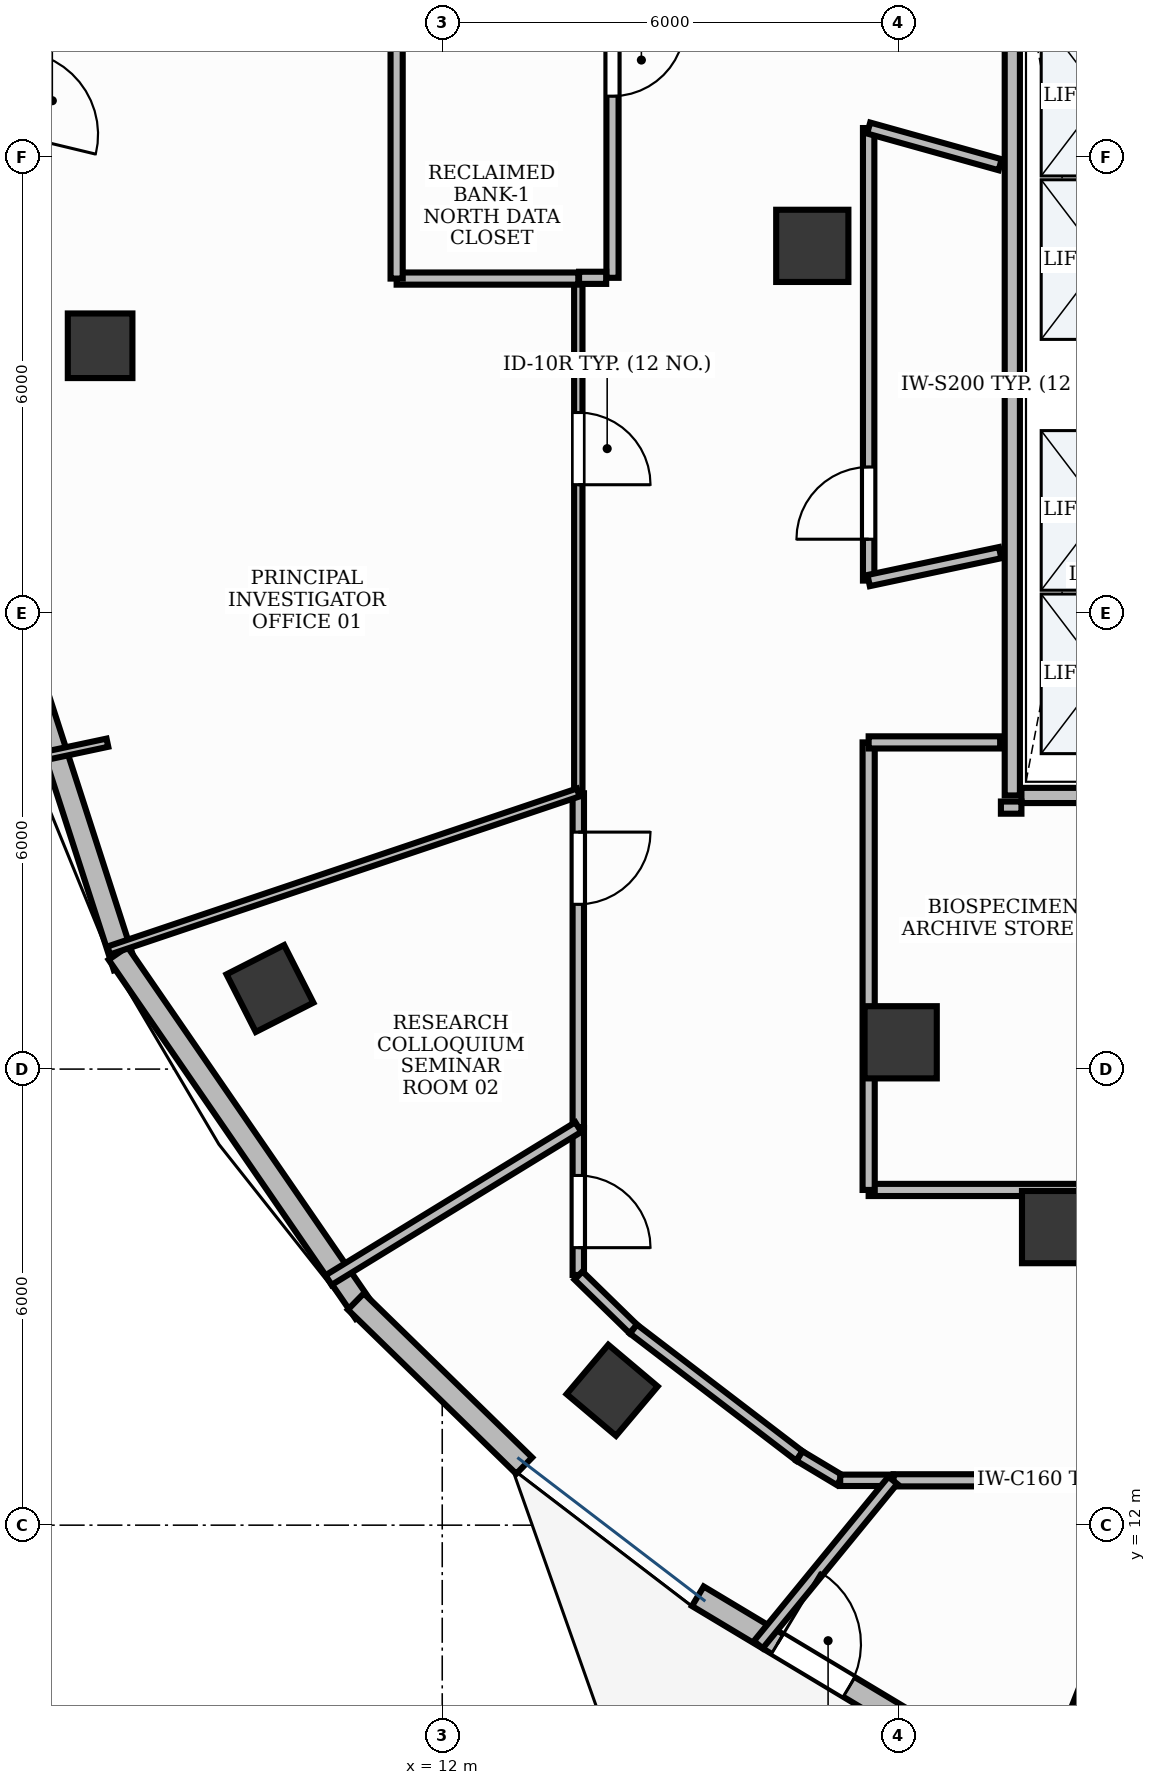
"""IFC4 building model, lengths in metres.
Left out: names, types, materials, properties, quantities, classifications, styles, units other than length and angle.
Written with IfcOpenShell. Run it as: python <this file> out.ifc"""

import sys

from ifc_helpers import new_model, si_unit, direction, frame, frame_2d, origin, origin_2d, place, context, subcontext, project, spatial, rectangle, extrude, element, fill, save


model = new_model("IFC4")
c1 = context("Model", 3, precision=1e-05, world=origin(), true_north=direction((0.0, 1.0)))
c2 = subcontext(c1, "Body", "Model", "MODEL_VIEW")
j1 = project(units=[si_unit("LENGTHUNIT", "METRE"), si_unit("PLANEANGLEUNIT", "RADIAN")], contexts=[c1])
p1 = place(None, origin())
s1 = spatial("IfcSite", under=j1, at=p1, CompositionType="ELEMENT")
p2 = place(p1, origin())
s2 = spatial("IfcBuilding", under=s1, at=p2, CompositionType="ELEMENT")
p3 = place(p2, frame((0.0, 0.0, 256.2)))
s3 = spatial("IfcBuildingStorey", under=s2, at=p3, CompositionType="ELEMENT", Elevation=256.2)
p4 = place(p3, frame((7.499, 27.516, -0.0), z_axis=(0.0, 0.0, 1.0), x_axis=(0.0, 1.0, 0.0)))
e1 = element("IfcColumn", 1, at=p4, inside=s3, PredefinedType="COLUMN", context=c2, shape_type="SweptSolid", body=[
    extrude(rectangle(XDim=0.85, YDim=0.85, at=origin_2d()), origin(), (0.0, 0.0, 1.0), 3.901),
])
p5 = place(p3, frame((16.868, 28.83, -0.0), z_axis=(0.0, 0.0, 1.0), x_axis=(1.0, 0.0, 0.0)))
e2 = element("IfcColumn", 2, at=p5, inside=s3, PredefinedType="COLUMN", context=c2, shape_type="SweptSolid", body=[
    extrude(rectangle(XDim=0.95, YDim=0.95, at=origin_2d()), origin(), (0.0, 0.0, 1.0), 3.901),
])
p6 = place(p3, frame((9.733, 19.06, -0.0), z_axis=(0.0, 0.0, 1.0), x_axis=(-0.453057191132, 0.891481453292, 0.0)))
e3 = element("IfcColumn", 3, at=p6, inside=s3, PredefinedType="COLUMN", context=c2, shape_type="SweptSolid", body=[
    extrude(rectangle(XDim=0.85, YDim=0.85, at=origin_2d()), origin(), (0.0, 0.0, 1.0), 3.901),
])
p7 = place(p3, frame((18.031, 18.353, -0.0), z_axis=(0.0, 0.0, 1.0), x_axis=(1.0, 0.0, 0.0)))
e4 = element("IfcColumn", 4, at=p7, inside=s3, PredefinedType="COLUMN", context=c2, shape_type="SweptSolid", body=[
    extrude(rectangle(XDim=0.95, YDim=0.95, at=origin_2d()), origin(), (0.0, 0.0, 1.0), 3.901),
])
p8 = place(p3, frame((14.235, 13.775, -0.0), z_axis=(0.0, 0.0, 1.0), x_axis=(-0.764246456939, 0.644924300253, 0.0)))
e5 = element("IfcColumn", 5, at=p8, inside=s3, PredefinedType="COLUMN", context=c2, shape_type="SweptSolid", body=[
    extrude(rectangle(XDim=0.85, YDim=0.85, at=origin_2d()), origin(), (0.0, 0.0, 1.0), 3.901),
])
p9 = place(p3, frame((20.102, 15.921, -0.0), z_axis=(0.0, 0.0, 1.0), x_axis=(1.0, 0.0, 0.0)))
e6 = element("IfcColumn", 6, at=p9, inside=s3, PredefinedType="COLUMN", context=c2, shape_type="SweptSolid", body=[
    extrude(rectangle(XDim=0.95, YDim=0.95, at=origin_2d()), origin(), (0.0, 0.0, 1.0), 3.901),
])
p10 = place(p3, frame((20.803, 9.78, -0.0), z_axis=(0.0, 0.0, 1.0), x_axis=(-0.930225540858, 0.366988341962, 0.0)))
e7 = element("IfcColumn", 7, at=p10, inside=s3, PredefinedType="COLUMN", context=c2, shape_type="SweptSolid", body=[
    extrude(rectangle(XDim=0.85, YDim=0.85, at=origin_2d()), origin(), (0.0, 0.0, 1.0), 3.901),
])
p11 = place(p3, frame((6.822, 32.164, 0.0), z_axis=(0.0, 0.0, 1.0), x_axis=(-0.233611743884, -0.972329961031, 0.0)))
e8 = element("IfcWall", 8, at=p11, inside=s3, PredefinedType="STANDARD", context=c2, shape_type="SweptSolid", body=[
    extrude(rectangle(XDim=2.745, YDim=0.3, at=frame_2d((1.373, 0.0))), origin(), (0.0, 0.0, 1.0), 3.9),
])
p12 = place(p11, frame((0.823, 0.0, 0.0)))
e9 = element("IfcOpeningElement", 9, at=p12, cuts=e8, PredefinedType="OPENING", context=c2, shape_type="SweptSolid", body=[
    extrude(rectangle(XDim=1.1, YDim=2.15, at=frame_2d((0.55, 1.075))), frame((0.0, 0.165, 0.0), z_axis=(0.0, -1.0, 0.0), x_axis=(1.0, 0.0, 0.0)), (0.0, 0.0, 1.0), 0.33),
])
p13 = place(p3, frame((15.363, 11.065, 0.0), z_axis=(0.0, 0.0, 1.0), x_axis=(0.857526080841, -0.514440492844, 0.0)))
e10 = element("IfcWall", 10, at=p13, inside=s3, PredefinedType="STANDARD", context=c2, shape_type="SweptSolid", body=[
    extrude(rectangle(XDim=3.249, YDim=0.3, at=frame_2d((1.624, 0.0))), origin(), (0.0, 0.0, 1.0), 3.9),
])
p14 = place(p13, frame((1.22, 0.0, 0.0)))
e11 = element("IfcOpeningElement", 11, at=p14, cuts=e10, PredefinedType="OPENING", context=c2, shape_type="SweptSolid", body=[
    extrude(rectangle(XDim=1.1, YDim=2.15, at=frame_2d((0.55, 1.075))), frame((0.0, 0.165, 0.0), z_axis=(0.0, -1.0, 0.0), x_axis=(1.0, 0.0, 0.0)), (0.0, 0.0, 1.0), 0.33),
])
p15 = place(p3, frame((6.147, 24.529, 0.0), z_axis=(0.0, 0.0, 1.0), x_axis=(0.307501658213, -0.951547544895, 0.0)))
e12 = element("IfcWall", 12, at=p15, inside=s3, PredefinedType="STANDARD", context=c2, shape_type="SweptSolid", body=[
    extrude(rectangle(XDim=5.447, YDim=0.3, at=frame_2d((2.724, 0.0))), origin(), (0.0, 0.0, 1.0), 3.9),
])
p16 = place(p3, frame((7.735, 19.524, 0.0), z_axis=(0.0, 0.0, 1.0), x_axis=(0.566669772846, -0.823945003349, 0.0)))
e13 = element("IfcWall", 13, at=p16, inside=s3, PredefinedType="STANDARD", context=c2, shape_type="SweptSolid", body=[
    extrude(rectangle(XDim=5.734, YDim=0.3, at=frame_2d((2.867, 0.0))), origin(), (0.0, 0.0, 1.0), 3.9),
])
p17 = place(p3, frame((10.863, 14.942, 0.0), z_axis=(0.0, 0.0, 1.0), x_axis=(0.71600802955, -0.698092043802, 0.0)))
e14 = element("IfcWall", 14, at=p17, inside=s3, PredefinedType="STANDARD", context=c2, shape_type="SweptSolid", body=[
    extrude(rectangle(XDim=3.093, YDim=0.3, at=frame_2d((1.547, 0.0))), origin(), (0.0, 0.0, 1.0), 3.9),
])
p18 = place(p3, frame((19.5, 21.6, 0.0), z_axis=(0.0, 0.0, 1.0), x_axis=(0.0, 1.0, 0.0)))
e15 = element("IfcWall", 15, at=p18, inside=s3, PredefinedType="PARTITIONING", context=c2, shape_type="SweptSolid", body=[
    extrude(rectangle(XDim=10.8, YDim=0.2, at=frame_2d((5.4, 0.0))), origin(), (0.0, 0.0, 1.0), 2.22),
])
p19 = place(p3, frame((19.62, 21.6, 0.0), z_axis=(0.0, 0.0, 1.0), x_axis=(1.0, 0.0, 0.0)))
e16 = element("IfcWall", 16, at=p19, inside=s3, PredefinedType="PARTITIONING", context=c2, shape_type="SweptSolid", body=[
    extrude(rectangle(XDim=2.11, YDim=0.2, at=frame_2d((1.055, 0.0))), origin(), (0.0, 0.0, 1.0), 2.22),
])
p20 = place(p3, frame((14.24, 31.99, 0.0), z_axis=(0.0, 0.0, 1.0), x_axis=(0.0, -1.0, 0.0)))
e17 = element("IfcWall", 17, at=p20, inside=s3, PredefinedType="PARTITIONING", context=c2, shape_type="SweptSolid", body=[
    extrude(rectangle(XDim=3.58, YDim=0.16, at=frame_2d((1.79, 0.0))), origin(), (0.0, 0.0, 1.0), 2.22),
])
p21 = place(p20, frame((0.24, 0.0, 0.0)))
e18 = element("IfcOpeningElement", 18, at=p21, cuts=e17, PredefinedType="OPENING", context=c2, shape_type="SweptSolid", body=[
    extrude(rectangle(XDim=0.95, YDim=2.15, at=frame_2d((0.475, 1.075))), frame((0.0, 0.095, 0.0), z_axis=(0.0, -1.0, 0.0), x_axis=(1.0, 0.0, 0.0)), (0.0, 0.0, 1.0), 0.19),
])
p22 = place(p3, frame((13.79, 28.39, 0.0), z_axis=(0.0, 0.0, 1.0), x_axis=(0.0, -1.0, 0.0)))
e19 = element("IfcWall", 19, at=p22, inside=s3, PredefinedType="MOVABLE", context=c2, shape_type="SweptSolid", body=[
    extrude(rectangle(XDim=6.75, YDim=0.11, at=frame_2d((3.375, 0.0))), origin(), (0.0, 0.0, 1.0), 2.22),
])
p23 = place(p22, frame((1.752, 0.0, 0.0)))
e20 = element("IfcOpeningElement", 20, at=p23, cuts=e19, PredefinedType="OPENING", context=c2, shape_type="SweptSolid", body=[
    extrude(rectangle(XDim=0.95, YDim=2.15, at=frame_2d((0.475, 1.075))), frame((0.0, 0.07, 0.0), z_axis=(0.0, -1.0, 0.0), x_axis=(1.0, 0.0, 0.0)), (0.0, 0.0, 1.0), 0.14),
])
p24 = place(p3, frame((13.79, 21.629, 0.0), z_axis=(0.0, 0.0, 1.0), x_axis=(0.0, -1.0, 0.0)))
e21 = element("IfcWall", 21, at=p24, inside=s3, PredefinedType="PARTITIONING", context=c2, shape_type="SweptSolid", body=[
    extrude(rectangle(XDim=4.392, YDim=0.15, at=frame_2d((2.196, 0.0))), origin(), (0.0, 0.0, 1.0), 2.22),
])
p25 = place(p24, frame((0.511, 0.0, 0.0)))
e22 = element("IfcOpeningElement", 22, at=p25, cuts=e21, PredefinedType="OPENING", context=c2, shape_type="SweptSolid", body=[
    extrude(rectangle(XDim=0.95, YDim=2.15, at=frame_2d((0.475, 1.075))), frame((0.0, 0.09, 0.0), z_axis=(0.0, -1.0, 0.0), x_axis=(1.0, 0.0, 0.0)), (0.0, 0.0, 1.0), 0.18),
])
p26 = place(p3, frame((13.79, 17.226, 0.0), z_axis=(0.0, 0.0, 1.0), x_axis=(0.0, -1.0, 0.0)))
e23 = element("IfcWall", 23, at=p26, inside=s3, PredefinedType="PARTITIONING", context=c2, shape_type="SweptSolid", body=[
    extrude(rectangle(XDim=1.934, YDim=0.15, at=frame_2d((0.967, 0.0))), origin(), (0.0, 0.0, 1.0), 2.22),
])
p27 = place(p26, frame((0.625, 0.0, 0.0)))
e24 = element("IfcOpeningElement", 24, at=p27, cuts=e23, PredefinedType="OPENING", context=c2, shape_type="SweptSolid", body=[
    extrude(rectangle(XDim=0.95, YDim=2.15, at=frame_2d((0.475, 1.075))), frame((0.0, 0.09, 0.0), z_axis=(0.0, -1.0, 0.0), x_axis=(1.0, 0.0, 0.0)), (0.0, 0.0, 1.0), 0.18),
])
p28 = place(p3, frame((17.938, 12.59, 0.0), z_axis=(0.0, 0.0, 1.0), x_axis=(1.0, 0.0, 0.0)))
e25 = element("IfcWall", 25, at=p28, inside=s3, PredefinedType="PARTITIONING", context=c2, shape_type="SweptSolid", body=[
    extrude(rectangle(XDim=8.246, YDim=0.16, at=frame_2d((4.123, 0.0))), origin(), (0.0, 0.0, 1.0), 2.22),
])
p29 = place(p28, frame((5.364, 0.0, 0.0)))
e26 = element("IfcOpeningElement", 26, at=p29, cuts=e25, PredefinedType="OPENING", context=c2, shape_type="SweptSolid", body=[
    extrude(rectangle(XDim=0.95, YDim=2.15, at=frame_2d((0.475, 1.075))), frame((0.0, 0.095, 0.0), z_axis=(0.0, -1.0, 0.0), x_axis=(1.0, 0.0, 0.0)), (0.0, 0.0, 1.0), 0.19),
])
p30 = place(p3, frame((17.61, 24.427, 0.0), z_axis=(0.0, 0.0, 1.0), x_axis=(0.0, 1.0, 0.0)))
e27 = element("IfcWall", 27, at=p30, inside=s3, PredefinedType="PARTITIONING", context=c2, shape_type="SweptSolid", body=[
    extrude(rectangle(XDim=5.954, YDim=0.15, at=frame_2d((2.977, 0.0))), origin(), (0.0, 0.0, 1.0), 2.22),
])
p31 = place(p30, frame((0.544, 0.0, 0.0)))
e28 = element("IfcOpeningElement", 28, at=p31, cuts=e27, PredefinedType="OPENING", context=c2, shape_type="SweptSolid", body=[
    extrude(rectangle(XDim=0.95, YDim=2.15, at=frame_2d((0.475, 1.075))), frame((0.0, 0.09, 0.0), z_axis=(0.0, -1.0, 0.0), x_axis=(1.0, 0.0, 0.0)), (0.0, 0.0, 1.0), 0.18),
])
p32 = place(p3, frame((14.157, 28.41, 0.0), z_axis=(0.0, 0.0, 1.0), x_axis=(-1.0, 0.0, 0.0)))
e29 = element("IfcWall", 29, at=p32, inside=s3, PredefinedType="PARTITIONING", context=c2, shape_type="SweptSolid", body=[
    extrude(rectangle(XDim=0.357, YDim=0.16, at=frame_2d((0.178, 0.0))), origin(), (0.0, 0.0, 1.0), 2.22),
])
p33 = place(p3, frame((13.79, 28.4, 0.0), z_axis=(0.0, 0.0, 1.0), x_axis=(-1.0, 0.0, 0.0)))
e30 = element("IfcWall", 30, at=p33, inside=s3, PredefinedType="PARTITIONING", context=c2, shape_type="SweptSolid", body=[
    extrude(rectangle(XDim=2.39, YDim=0.16, at=frame_2d((1.195, 0.0))), origin(), (0.0, 0.0, 1.0), 2.22),
])
p34 = place(p3, frame((11.4, 28.4, 0.0), z_axis=(0.0, 0.0, 1.0), x_axis=(0.0, 1.0, 0.0)))
e31 = element("IfcWall", 31, at=p34, inside=s3, PredefinedType="PARTITIONING", context=c2, shape_type="SweptSolid", body=[
    extrude(rectangle(XDim=3.6, YDim=0.16, at=frame_2d((1.8, 0.0))), origin(), (0.0, 0.0, 1.0), 2.22),
])
p35 = place(p3, frame((13.79, 21.639, 0.0), z_axis=(0.0, 0.0, 1.0), x_axis=(-0.947761619346, -0.318979486636, 0.0)))
e32 = element("IfcWall", 32, at=p35, inside=s3, PredefinedType="MOVABLE", context=c2, shape_type="SweptSolid", body=[
    extrude(rectangle(XDim=6.518, YDim=0.11, at=frame_2d((3.259, 0.0))), origin(), (0.0, 0.0, 1.0), 2.22),
])
p36 = place(p3, frame((6.617, 22.086, 0.0), z_axis=(0.0, 0.0, 1.0), x_axis=(0.978112274726, 0.208077817245, 0.0)))
e33 = element("IfcWall", 33, at=p36, inside=s3, PredefinedType="MOVABLE", context=c2, shape_type="SweptSolid", body=[
    extrude(rectangle(XDim=1.0, YDim=0.11, at=frame_2d((0.5, 0.0))), origin(), (0.0, 0.0, 1.0), 2.22),
])
p37 = place(p3, frame((13.79, 17.237, 0.0), z_axis=(0.0, 0.0, 1.0), x_axis=(-0.852642224979, -0.522495202066, 0.0)))
e34 = element("IfcWall", 34, at=p37, inside=s3, PredefinedType="PARTITIONING", context=c2, shape_type="SweptSolid", body=[
    extrude(rectangle(XDim=3.854, YDim=0.15, at=frame_2d((1.927, 0.0))), origin(), (0.0, 0.0, 1.0), 2.22),
])
p38 = place(p3, frame((13.793, 15.284, 0.0), z_axis=(0.0, 0.0, 1.0), x_axis=(0.7160122468, -0.698087718294, 0.0)))
e35 = element("IfcWall", 35, at=p38, inside=s3, PredefinedType="PARTITIONING", context=c2, shape_type="SweptSolid", body=[
    extrude(rectangle(XDim=1.008, YDim=0.15, at=frame_2d((0.504, 0.0))), origin(), (0.0, 0.0, 1.0), 2.22),
])
p39 = place(p3, frame((14.516, 14.58, 0.0), z_axis=(0.0, 0.0, 1.0), x_axis=(0.794390609039, -0.60740724417, 0.0)))
e36 = element("IfcWall", 36, at=p39, inside=s3, PredefinedType="PARTITIONING", context=c2, shape_type="SweptSolid", body=[
    extrude(rectangle(XDim=2.749, YDim=0.15, at=frame_2d((1.374, 0.0))), origin(), (0.0, 0.0, 1.0), 2.22),
])
p40 = place(p3, frame((16.7, 12.91, 0.0), z_axis=(0.0, 0.0, 1.0), x_axis=(0.857458106414, -0.514553783141, 0.0)))
e37 = element("IfcWall", 37, at=p40, inside=s3, PredefinedType="PARTITIONING", context=c2, shape_type="SweptSolid", body=[
    extrude(rectangle(XDim=0.619, YDim=0.15, at=frame_2d((0.309, 0.0))), origin(), (0.0, 0.0, 1.0), 2.22),
])
p41 = place(p3, frame((17.236, 12.59, 0.0), z_axis=(0.0, 0.0, 1.0), x_axis=(1.0, 0.0, 0.0)))
e38 = element("IfcWall", 38, at=p41, inside=s3, PredefinedType="PARTITIONING", context=c2, shape_type="SweptSolid", body=[
    extrude(rectangle(XDim=0.692, YDim=0.15, at=frame_2d((0.346, 0.0))), origin(), (0.0, 0.0, 1.0), 2.22),
])
p42 = place(p3, frame((17.928, 12.59, 0.0), z_axis=(0.0, 0.0, 1.0), x_axis=(-0.633318665549, -0.773891121455, 0.0)))
e39 = element("IfcWall", 39, at=p42, inside=s3, PredefinedType="PARTITIONING", context=c2, shape_type="SweptSolid", body=[
    extrude(rectangle(XDim=2.794, YDim=0.15, at=frame_2d((1.397, 0.0))), origin(), (0.0, 0.0, 1.0), 2.22),
])
p43 = place(p3, frame((19.35, 21.44, 0.0), z_axis=(0.0, 0.0, 1.0), x_axis=(1.0, 0.0, 0.0)))
e40 = element("IfcWall", 40, at=p43, inside=s3, PredefinedType="PARTITIONING", context=c2, shape_type="SweptSolid", body=[
    extrude(rectangle(XDim=0.27, YDim=0.16, at=frame_2d((0.135, 0.0))), origin(), (0.0, 0.0, 1.0), 2.22),
])
p44 = place(p3, frame((25.6, 16.41, 0.0), z_axis=(0.0, 0.0, 1.0), x_axis=(-1.0, 0.0, 0.0)))
e41 = element("IfcWall", 41, at=p44, inside=s3, PredefinedType="PARTITIONING", context=c2, shape_type="SweptSolid", body=[
    extrude(rectangle(XDim=7.99, YDim=0.16, at=frame_2d((3.995, 0.0))), origin(), (0.0, 0.0, 1.0), 2.22),
])
p45 = place(p3, frame((17.61, 16.41, 0.0), z_axis=(0.0, 0.0, 1.0), x_axis=(0.0, 1.0, 0.0)))
e42 = element("IfcWall", 42, at=p45, inside=s3, PredefinedType="PARTITIONING", context=c2, shape_type="SweptSolid", body=[
    extrude(rectangle(XDim=5.888, YDim=0.16, at=frame_2d((2.944, 0.0))), origin(), (0.0, 0.0, 1.0), 2.22),
])
p46 = place(p3, frame((17.61, 22.298, 0.0), z_axis=(0.0, 0.0, 1.0), x_axis=(1.0, 0.0, 0.0)))
e43 = element("IfcWall", 43, at=p46, inside=s3, PredefinedType="PARTITIONING", context=c2, shape_type="SweptSolid", body=[
    extrude(rectangle(XDim=1.73, YDim=0.16, at=frame_2d((0.865, 0.0))), origin(), (0.0, 0.0, 1.0), 2.22),
])
p47 = place(p3, frame((19.34, 24.795, 0.0), z_axis=(0.0, 0.0, 1.0), x_axis=(-0.978152535578, -0.207888472845, 0.0)))
e44 = element("IfcWall", 44, at=p47, inside=s3, PredefinedType="PARTITIONING", context=c2, shape_type="SweptSolid", body=[
    extrude(rectangle(XDim=1.769, YDim=0.15, at=frame_2d((0.884, 0.0))), origin(), (0.0, 0.0, 1.0), 2.22),
])
p48 = place(p3, frame((17.61, 30.381, 0.0), z_axis=(0.0, 0.0, 1.0), x_axis=(0.963143086718, -0.268989580668, 0.0)))
e45 = element("IfcWall", 45, at=p48, inside=s3, PredefinedType="PARTITIONING", context=c2, shape_type="SweptSolid", body=[
    extrude(rectangle(XDim=1.796, YDim=0.15, at=frame_2d((0.898, 0.0))), origin(), (0.0, 0.0, 1.0), 2.22),
])
p49 = place(p14, origin())
e46 = element("IfcDoor", 46, at=p49, inside=s3, OperationType="SINGLE_SWING_LEFT", PredefinedType="DOOR", context=c2, shape_type="SweptSolid", body=[
    extrude(rectangle(XDim=1.1, YDim=2.15, at=frame_2d((0.55, 1.075))), frame((0.0, 0.025, 0.0), z_axis=(0.0, -1.0, 0.0), x_axis=(1.0, 0.0, 0.0)), (0.0, 0.0, 1.0), 0.05),
])
fill(e11, e46)
p50 = place(p21, origin())
e47 = element("IfcDoor", 47, at=p50, inside=s3, OperationType="SINGLE_SWING_LEFT", PredefinedType="DOOR", context=c2, shape_type="SweptSolid", body=[
    extrude(rectangle(XDim=0.95, YDim=2.15, at=frame_2d((0.475, 1.075))), frame((0.0, 0.025, 0.0), z_axis=(0.0, -1.0, 0.0), x_axis=(1.0, 0.0, 0.0)), (0.0, 0.0, 1.0), 0.05),
])
fill(e18, e47)
p51 = place(p23, origin())
e48 = element("IfcDoor", 48, at=p51, inside=s3, OperationType="SINGLE_SWING_RIGHT", PredefinedType="DOOR", context=c2, shape_type="SweptSolid", body=[
    extrude(rectangle(XDim=0.95, YDim=2.15, at=frame_2d((0.475, 1.075))), frame((0.0, 0.025, 0.0), z_axis=(0.0, -1.0, 0.0), x_axis=(1.0, 0.0, 0.0)), (0.0, 0.0, 1.0), 0.05),
])
fill(e20, e48)
p52 = place(p25, origin())
e49 = element("IfcDoor", 49, at=p52, inside=s3, OperationType="SINGLE_SWING_LEFT", PredefinedType="DOOR", context=c2, shape_type="SweptSolid", body=[
    extrude(rectangle(XDim=0.95, YDim=2.15, at=frame_2d((0.475, 1.075))), frame((0.0, 0.025, 0.0), z_axis=(0.0, -1.0, 0.0), x_axis=(1.0, 0.0, 0.0)), (0.0, 0.0, 1.0), 0.05),
])
fill(e22, e49)
p53 = place(p27, origin())
e50 = element("IfcDoor", 50, at=p53, inside=s3, OperationType="SINGLE_SWING_RIGHT", PredefinedType="DOOR", context=c2, shape_type="SweptSolid", body=[
    extrude(rectangle(XDim=0.95, YDim=2.15, at=frame_2d((0.475, 1.075))), frame((0.0, 0.025, 0.0), z_axis=(0.0, -1.0, 0.0), x_axis=(1.0, 0.0, 0.0)), (0.0, 0.0, 1.0), 0.05),
])
fill(e24, e50)
p54 = place(p31, origin())
e51 = element("IfcDoor", 51, at=p54, inside=s3, OperationType="SINGLE_SWING_LEFT", PredefinedType="DOOR", context=c2, shape_type="SweptSolid", body=[
    extrude(rectangle(XDim=0.95, YDim=2.15, at=frame_2d((0.475, 1.075))), frame((0.0, 0.025, 0.0), z_axis=(0.0, -1.0, 0.0), x_axis=(1.0, 0.0, 0.0)), (0.0, 0.0, 1.0), 0.05),
])
fill(e28, e51)
save(model, sys.argv[1])
